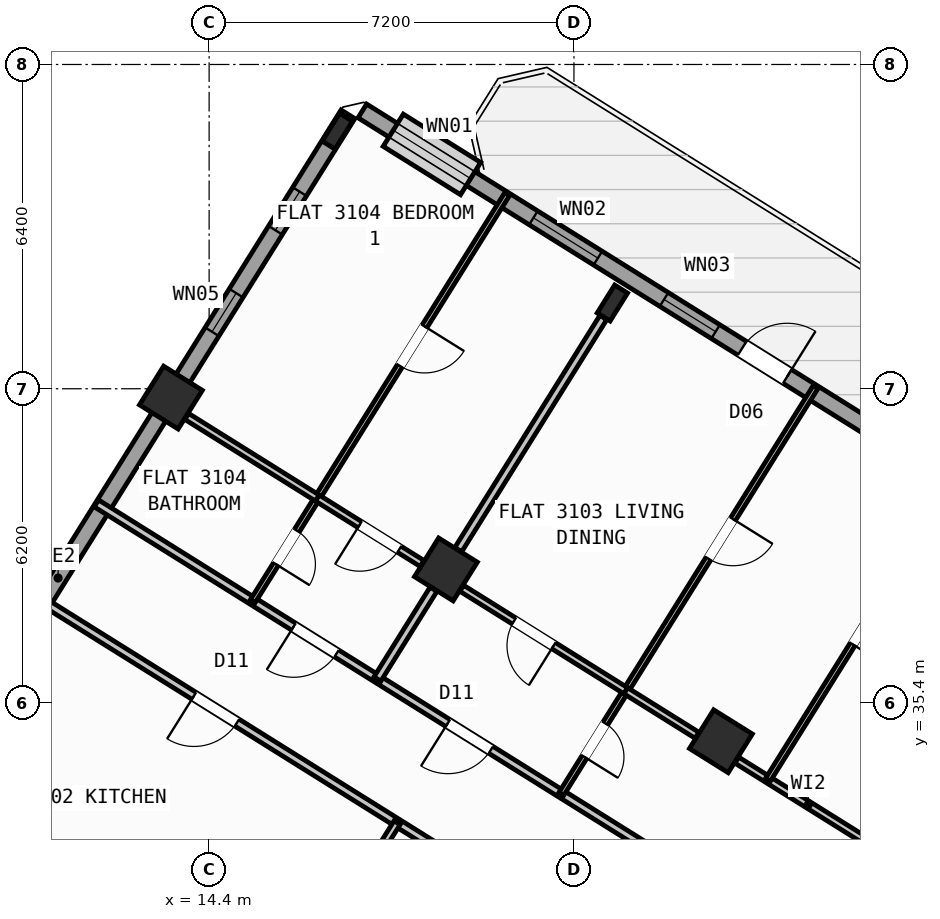
"""IFC4 building model, lengths in metres.
Left out: names, types, materials, properties, quantities, classifications, styles, units other than length and angle.
Written with IfcOpenShell. Run it as: python <this file> out.ifc"""

import sys

from ifc_helpers import new_model, si_unit, direction, frame, frame_2d, origin, origin_2d, place, context, subcontext, project, spatial, rectangle, hollow_rectangle, i_section, extrude, source, transform, mapped, element, fill, save


model = new_model("IFC4")
c1 = context("Model", 3, precision=1e-05, world=origin(), true_north=direction((0.0, 1.0)))
c2 = subcontext(c1, "Body", "Model", "MODEL_VIEW")
j1 = project(units=[si_unit("LENGTHUNIT", "METRE"), si_unit("PLANEANGLEUNIT", "RADIAN")], contexts=[c1])
p1 = place(None, origin())
s1 = spatial("IfcSite", under=j1, at=p1, CompositionType="ELEMENT")
p2 = place(p1, origin())
s2 = spatial("IfcBuilding", under=s1, at=p2, CompositionType="ELEMENT")
p3 = place(p2, frame((0.0, 0.0, 123.3)))
s3 = spatial("IfcBuildingStorey", under=s2, at=p3, CompositionType="ELEMENT", Elevation=123.3)
m1 = source(origin(), c2, "Body", "SweptSolid", [
    extrude(hollow_rectangle(XDim=0.9, YDim=0.9, WallThickness=0.036, at=origin_2d()), origin(), (0.0, 0.0, 1.0), 4.5),
])
p4 = place(p3, frame((24.5, 34.643, 0.0), z_axis=(0.0, 0.0, 1.0), x_axis=(-0.848048096156, 0.529919264233, 0.0)))
e1 = element("IfcColumn", 1, at=p4, inside=s3, PredefinedType="COLUMN", context=c2, shape_type="MappedRepresentation", body=[
    mapped(m1, transform((0.0, 0.0, 0.0), scale=1.0)),
])
m2 = source(origin(), c2, "Body", "SweptSolid", [
    extrude(i_section(OverallWidth=0.3, OverallDepth=0.65, WebThickness=0.016, FlangeThickness=0.031, at=origin_2d()), origin(), (0.0, 0.0, 1.0), 4.5),
])
p5 = place(p3, frame((22.358, 43.292, 0.0), z_axis=(0.0, 0.0, 1.0), x_axis=(-0.848048096156, 0.529919264233, 0.0)))
e2 = element("IfcColumn", 2, at=p5, inside=s3, PredefinedType="COLUMN", context=c2, shape_type="MappedRepresentation", body=[
    mapped(m2, transform((0.0, 0.0, 0.0), scale=1.0)),
])
p6 = place(p3, frame((19.073, 38.034, 0.0), z_axis=(0.0, 0.0, 1.0), x_axis=(-0.848048096156, 0.529919264233, 0.0)))
e3 = element("IfcColumn", 3, at=p6, inside=s3, PredefinedType="COLUMN", context=c2, shape_type="MappedRepresentation", body=[
    mapped(m1, transform((0.0, 0.0, 0.0), scale=1.0)),
])
p7 = place(p3, frame((16.931, 46.684, 0.0), z_axis=(0.0, 0.0, 1.0), x_axis=(-0.848048096156, 0.529919264233, 0.0)))
e4 = element("IfcColumn", 4, at=p7, inside=s3, PredefinedType="COLUMN", context=c2, shape_type="MappedRepresentation", body=[
    mapped(m2, transform((0.0, 0.0, 0.0), scale=1.0)),
])
p8 = place(p3, frame((13.646, 41.426, 0.0), z_axis=(0.0, 0.0, 1.0), x_axis=(-0.848048096156, 0.529919264233, 0.0)))
e5 = element("IfcColumn", 5, at=p8, inside=s3, PredefinedType="COLUMN", context=c2, shape_type="MappedRepresentation", body=[
    mapped(m1, transform((0.0, 0.0, 0.0), scale=1.0)),
])
p9 = place(p3, frame((5.7, 28.71, 0.0), z_axis=(0.0, 0.0, 1.0), x_axis=(0.529923711467, 0.8480453172, 0.0)))
e6 = element("IfcWall", 6, at=p9, inside=s3, PredefinedType="STANDARD", context=c2, shape_type="SweptSolid", body=[
    extrude(rectangle(XDim=21.587, YDim=0.32, at=frame_2d((10.794, 0.0))), origin(), (0.0, 0.0, 1.0), 2.395),
])
p10 = place(p9, frame((2.719, 0.0, 1.0)))
e7 = element("IfcOpeningElement", 7, at=p10, cuts=e6, PredefinedType="OPENING", context=c2, shape_type="SweptSolid", body=[
    extrude(rectangle(XDim=0.9, YDim=1.25, at=frame_2d((0.45, 0.625))), frame((0.0, 0.17, 0.0), z_axis=(0.0, -1.0, 0.0), x_axis=(1.0, 0.0, 0.0)), (0.0, 0.0, 1.0), 0.34),
])
p11 = place(p9, frame((16.525, 0.0, 1.0)))
e8 = element("IfcOpeningElement", 8, at=p11, cuts=e6, PredefinedType="OPENING", context=c2, shape_type="SweptSolid", body=[
    extrude(rectangle(XDim=0.9, YDim=1.25, at=frame_2d((0.45, 0.625))), frame((0.0, 0.17, 0.0), z_axis=(0.0, -1.0, 0.0), x_axis=(1.0, 0.0, 0.0)), (0.0, 0.0, 1.0), 0.34),
])
p12 = place(p9, frame((18.887, 0.0, 1.0)))
e9 = element("IfcOpeningElement", 9, at=p12, cuts=e6, PredefinedType="OPENING", context=c2, shape_type="SweptSolid", body=[
    extrude(rectangle(XDim=0.9, YDim=1.25, at=frame_2d((0.45, 0.625))), frame((0.0, 0.17, 0.0), z_axis=(0.0, -1.0, 0.0), x_axis=(1.0, 0.0, 0.0)), (0.0, 0.0, 1.0), 0.34),
])
p13 = place(p3, frame((17.424, 47.083, 0.0), z_axis=(0.0, 0.0, 1.0), x_axis=(0.848049927979, -0.529916332693, 0.0)))
e10 = element("IfcWall", 10, at=p13, inside=s3, PredefinedType="STANDARD", context=c2, shape_type="SweptSolid", body=[
    extrude(rectangle(XDim=29.223, YDim=0.32, at=frame_2d((14.612, 0.0))), origin(), (0.0, 0.0, 1.0), 4.22),
])
p14 = place(p13, frame((8.839, 0.0, 0.0)))
e11 = element("IfcOpeningElement", 11, at=p14, cuts=e10, PredefinedType="OPENING", context=c2, shape_type="SweptSolid", body=[
    extrude(rectangle(XDim=1.05, YDim=2.15, at=frame_2d((0.525, 1.075))), frame((0.0, 0.17, 0.0), z_axis=(0.0, -1.0, 0.0), x_axis=(1.0, 0.0, 0.0)), (0.0, 0.0, 1.0), 0.34),
])
p15 = place(p13, frame((0.719, 0.0, 0.85)))
e12 = element("IfcOpeningElement", 12, at=p15, cuts=e10, PredefinedType="OPENING", context=c2, shape_type="SweptSolid", body=[
    extrude(rectangle(XDim=1.8, YDim=1.5, at=frame_2d((0.9, 0.75))), frame((0.0, 0.17, 0.0), z_axis=(0.0, -1.0, 0.0), x_axis=(1.0, 0.0, 0.0)), (0.0, 0.0, 1.0), 0.34),
])
p16 = place(p13, frame((3.981, 0.0, 0.85)))
e13 = element("IfcOpeningElement", 13, at=p16, cuts=e10, PredefinedType="OPENING", context=c2, shape_type="SweptSolid", body=[
    extrude(rectangle(XDim=1.5, YDim=1.5, at=frame_2d((0.75, 0.75))), frame((0.0, 0.17, 0.0), z_axis=(0.0, -1.0, 0.0), x_axis=(1.0, 0.0, 0.0)), (0.0, 0.0, 1.0), 0.34),
])
p17 = place(p13, frame((7.021, 0.0, 0.95)))
e14 = element("IfcOpeningElement", 14, at=p17, cuts=e10, PredefinedType="OPENING", context=c2, shape_type="SweptSolid", body=[
    extrude(rectangle(XDim=1.2, YDim=1.4, at=frame_2d((0.6, 0.7))), frame((0.0, 0.17, 0.0), z_axis=(0.0, -1.0, 0.0), x_axis=(1.0, 0.0, 0.0)), (0.0, 0.0, 1.0), 0.34),
])
p18 = place(p13, frame((14.471, 0.0, 0.95)))
e15 = element("IfcOpeningElement", 15, at=p18, cuts=e10, PredefinedType="OPENING", context=c2, shape_type="SweptSolid", body=[
    extrude(rectangle(XDim=1.2, YDim=1.4, at=frame_2d((0.6, 0.7))), frame((0.0, 0.17, 0.0), z_axis=(0.0, -1.0, 0.0), x_axis=(1.0, 0.0, 0.0)), (0.0, 0.0, 1.0), 0.34),
])
p19 = place(p13, frame((17.254, 0.0, 1.0)))
e16 = element("IfcOpeningElement", 16, at=p19, cuts=e10, PredefinedType="OPENING", context=c2, shape_type="SweptSolid", body=[
    extrude(rectangle(XDim=0.9, YDim=1.25, at=frame_2d((0.45, 0.625))), frame((0.0, 0.17, 0.0), z_axis=(0.0, -1.0, 0.0), x_axis=(1.0, 0.0, 0.0)), (0.0, 0.0, 1.0), 0.34),
])
p20 = place(p13, frame((20.764, 0.0, 0.8)))
e17 = element("IfcOpeningElement", 17, at=p20, cuts=e10, PredefinedType="OPENING", context=c2, shape_type="SweptSolid", body=[
    extrude(rectangle(XDim=2.1, YDim=1.55, at=frame_2d((1.05, 0.775))), frame((0.0, 0.17, 0.0), z_axis=(0.0, -1.0, 0.0), x_axis=(1.0, 0.0, 0.0)), (0.0, 0.0, 1.0), 0.34),
])
p21 = place(p13, frame((25.403, 0.0, 0.8)))
e18 = element("IfcOpeningElement", 18, at=p21, cuts=e10, PredefinedType="OPENING", context=c2, shape_type="SweptSolid", body=[
    extrude(rectangle(XDim=2.1, YDim=1.55, at=frame_2d((1.05, 0.775))), frame((0.0, 0.17, 0.0), z_axis=(0.0, -1.0, 0.0), x_axis=(1.0, 0.0, 0.0)), (0.0, 0.0, 1.0), 0.34),
])
p22 = place(p3, frame((31.239, 38.274, 0.0), z_axis=(0.0, 0.0, 1.0), x_axis=(-0.529920220799, -0.848047498427, 0.0)))
e19 = element("IfcWall", 19, at=p22, inside=s3, PredefinedType="PARTITIONING", context=c2, shape_type="SweptSolid", body=[
    extrude(rectangle(XDim=9.2, YDim=0.16, at=frame_2d((4.6, 0.0))), origin(), (0.0, 0.0, 1.0), 4.21),
])
p23 = place(p3, frame((26.363, 30.472, 0.0), z_axis=(0.0, 0.0, 1.0), x_axis=(-0.848052408131, 0.529912363569, 0.0)))
e20 = element("IfcWall", 20, at=p23, inside=s3, PredefinedType="PARTITIONING", context=c2, shape_type="SweptSolid", body=[
    extrude(rectangle(XDim=16.73, YDim=0.16, at=frame_2d((8.365, 0.0))), origin(), (0.0, 0.0, 1.0), 4.21),
])
p24 = place(p23, frame((7.55, 0.0, 0.0)))
e21 = element("IfcOpeningElement", 21, at=p24, cuts=e20, PredefinedType="OPENING", context=c2, shape_type="SweptSolid", body=[
    extrude(rectangle(XDim=1.0, YDim=2.1, at=frame_2d((0.5, 1.05))), frame((0.0, 0.09, 0.0), z_axis=(0.0, -1.0, 0.0), x_axis=(1.0, 0.0, 0.0)), (0.0, 0.0, 1.0), 0.18),
])
p25 = place(p23, frame((11.14, 0.0, 0.0)))
e22 = element("IfcOpeningElement", 22, at=p25, cuts=e20, PredefinedType="OPENING", context=c2, shape_type="SweptSolid", body=[
    extrude(rectangle(XDim=1.0, YDim=2.1, at=frame_2d((0.5, 1.05))), frame((0.0, 0.09, 0.0), z_axis=(0.0, -1.0, 0.0), x_axis=(1.0, 0.0, 0.0)), (0.0, 0.0, 1.0), 0.18),
])
p26 = place(p3, frame((25.198, 28.606, 0.0), z_axis=(0.0, 0.0, 1.0), x_axis=(-0.848052408131, 0.529912363569, 0.0)))
e23 = element("IfcWall", 23, at=p26, inside=s3, PredefinedType="PARTITIONING", context=c2, shape_type="SweptSolid", body=[
    extrude(rectangle(XDim=16.73, YDim=0.16, at=frame_2d((8.365, 0.0))), origin(), (0.0, 0.0, 1.0), 4.21),
])
p27 = place(p26, frame((2.22, 0.0, 0.0)))
e24 = element("IfcOpeningElement", 24, at=p27, cuts=e23, PredefinedType="OPENING", context=c2, shape_type="SweptSolid", body=[
    extrude(rectangle(XDim=0.86, YDim=2.05, at=frame_2d((0.43, 1.025))), frame((0.0, 0.09, 0.0), z_axis=(0.0, -1.0, 0.0), x_axis=(1.0, 0.0, 0.0)), (0.0, 0.0, 1.0), 0.18),
])
p28 = place(p26, frame((12.084, 0.0, 0.0)))
e25 = element("IfcOpeningElement", 25, at=p28, cuts=e23, PredefinedType="OPENING", context=c2, shape_type="SweptSolid", body=[
    extrude(rectangle(XDim=1.0, YDim=2.1, at=frame_2d((0.5, 1.05))), frame((0.0, 0.09, 0.0), z_axis=(0.0, -1.0, 0.0), x_axis=(1.0, 0.0, 0.0)), (0.0, 0.0, 1.0), 0.18),
])
p29 = place(p3, frame((19.556, 26.73, 0.0), z_axis=(0.0, 0.0, 1.0), x_axis=(-0.848043949058, 0.52992590092, 0.0)))
e26 = element("IfcWall", 26, at=p29, inside=s3, PredefinedType="PLUMBINGWALL", context=c2, shape_type="SweptSolid", body=[
    extrude(rectangle(XDim=12.92, YDim=0.14, at=frame_2d((6.46, 0.0))), origin(), (0.0, 0.0, 1.0), 4.21),
])
p30 = place(p29, frame((5.849, 0.0, 0.0)))
e27 = element("IfcOpeningElement", 27, at=p30, cuts=e26, PredefinedType="OPENING", context=c2, shape_type="SweptSolid", body=[
    extrude(rectangle(XDim=0.92, YDim=2.08, at=frame_2d((0.46, 1.04))), frame((0.0, 0.08, 0.0), z_axis=(0.0, -1.0, 0.0), x_axis=(1.0, 0.0, 0.0)), (0.0, 0.0, 1.0), 0.16),
])
p31 = place(p3, frame((18.109, 33.035, 0.0), z_axis=(0.0, 0.0, 1.0), x_axis=(-0.529893526057, -0.848064178611, 0.0)))
e28 = element("IfcWall", 28, at=p31, inside=s3, PredefinedType="PLUMBINGWALL", context=c2, shape_type="SweptSolid", body=[
    extrude(rectangle(XDim=4.58, YDim=0.14, at=frame_2d((2.29, 0.0))), origin(), (0.0, 0.0, 1.0), 4.21),
])
p32 = place(p31, frame((1.9, 0.0, 0.0)))
e29 = element("IfcOpeningElement", 29, at=p32, cuts=e28, PredefinedType="OPENING", context=c2, shape_type="SweptSolid", body=[
    extrude(rectangle(XDim=0.78, YDim=2.05, at=frame_2d((0.39, 1.025))), frame((0.0, 0.08, 0.0), z_axis=(0.0, -1.0, 0.0), x_axis=(1.0, 0.0, 0.0)), (0.0, 0.0, 1.0), 0.16),
])
p33 = place(p3, frame((22.18, 43.006, 0.0), z_axis=(0.0, 0.0, 1.0), x_axis=(-0.529913610495, -0.848051628978, 0.0)))
e30 = element("IfcWall", 30, at=p33, inside=s3, PredefinedType="PARTITIONING", context=c2, shape_type="SweptSolid", body=[
    extrude(rectangle(XDim=5.401, YDim=0.16, at=frame_2d((2.7, 0.0))), origin(), (0.0, 0.0, 1.0), 4.21),
])
p34 = place(p3, frame((18.828, 37.643, 0.0), z_axis=(0.0, 0.0, 1.0), x_axis=(-0.529904345651, -0.848057418139, 0.0)))
e31 = element("IfcWall", 31, at=p34, inside=s3, PredefinedType="PARTITIONING", context=c2, shape_type="SweptSolid", body=[
    extrude(rectangle(XDim=2.088, YDim=0.16, at=frame_2d((1.044, 0.0))), origin(), (0.0, 0.0, 1.0), 2.395),
])
p35 = place(p3, frame((26.37, 41.635, 0.0), z_axis=(0.0, 0.0, 1.0), x_axis=(-0.529917830441, -0.848048992088, 0.0)))
e32 = element("IfcWall", 32, at=p35, inside=s3, PredefinedType="PARTITIONING", context=c2, shape_type="SweptSolid", body=[
    extrude(rectangle(XDim=9.47, YDim=0.11, at=frame_2d((4.735, 0.0))), origin(), (0.0, 0.0, 1.0), 3.865),
])
p36 = place(p35, frame((7.83, 0.0, 0.0)))
e33 = element("IfcOpeningElement", 33, at=p36, cuts=e32, PredefinedType="OPENING", context=c2, shape_type="SweptSolid", body=[
    extrude(rectangle(XDim=0.78, YDim=2.05, at=frame_2d((0.39, 1.025))), frame((0.0, 0.065, 0.0), z_axis=(0.0, -1.0, 0.0), x_axis=(1.0, 0.0, 0.0)), (0.0, 0.0, 1.0), 0.13),
])
p37 = place(p35, frame((3.075, 0.0, 0.0)))
e34 = element("IfcOpeningElement", 34, at=p37, cuts=e32, PredefinedType="OPENING", context=c2, shape_type="SweptSolid", body=[
    extrude(rectangle(XDim=0.92, YDim=2.08, at=frame_2d((0.46, 1.04))), frame((0.0, 0.065, 0.0), z_axis=(0.0, -1.0, 0.0), x_axis=(1.0, 0.0, 0.0)), (0.0, 0.0, 1.0), 0.13),
])
p38 = place(p3, frame((22.623, 35.639, 0.0), z_axis=(0.0, 0.0, 1.0), x_axis=(-0.8480485946, 0.529918466555, 0.0)))
e35 = element("IfcWall", 35, at=p38, inside=s3, PredefinedType="PLUMBINGWALL", context=c2, shape_type="SweptSolid", body=[
    extrude(rectangle(XDim=3.818, YDim=0.14, at=frame_2d((1.909, 0.0))), origin(), (0.0, 0.0, 1.0), 2.395),
])
p39 = place(p38, frame((1.68, 0.0, 0.0)))
e36 = element("IfcOpeningElement", 36, at=p39, cuts=e35, PredefinedType="OPENING", context=c2, shape_type="SweptSolid", body=[
    extrude(rectangle(XDim=0.92, YDim=2.08, at=frame_2d((0.46, 1.04))), frame((0.0, 0.08, 0.0), z_axis=(0.0, -1.0, 0.0), x_axis=(1.0, 0.0, 0.0)), (0.0, 0.0, 1.0), 0.16),
])
p40 = place(p3, frame((27.635, 32.507, 0.0), z_axis=(0.0, 0.0, 1.0), x_axis=(-0.848064240775, 0.529893426567, 0.0)))
e37 = element("IfcWall", 37, at=p40, inside=s3, PredefinedType="PLUMBINGWALL", context=c2, shape_type="SweptSolid", body=[
    extrude(rectangle(XDim=3.328, YDim=0.14, at=frame_2d((1.664, 0.0))), origin(), (0.0, 0.0, 1.0), 2.395),
])
p41 = place(p3, frame((24.029, 34.76, 0.0), z_axis=(0.0, 0.0, 1.0), x_axis=(-0.848023120795, 0.529959231071, 0.0)))
e38 = element("IfcWall", 38, at=p41, inside=s3, PredefinedType="PLUMBINGWALL", context=c2, shape_type="SweptSolid", body=[
    extrude(rectangle(XDim=1.658, YDim=0.14, at=frame_2d((0.829, 0.0))), origin(), (0.0, 0.0, 1.0), 2.395),
])
p42 = place(p3, frame((29.177, 39.881, 0.0), z_axis=(0.0, 0.0, 1.0), x_axis=(-0.529930649952, -0.848040981463, 0.0)))
e39 = element("IfcWall", 39, at=p42, inside=s3, PredefinedType="PARTITIONING", context=c2, shape_type="SweptSolid", body=[
    extrude(rectangle(XDim=7.07, YDim=0.11, at=frame_2d((3.535, 0.0))), origin(), (0.0, 0.0, 1.0), 4.21),
])
p43 = place(p42, frame((3.0, 0.0, 0.0)))
e40 = element("IfcOpeningElement", 40, at=p43, cuts=e39, PredefinedType="OPENING", context=c2, shape_type="SweptSolid", body=[
    extrude(rectangle(XDim=0.92, YDim=2.08, at=frame_2d((0.46, 1.04))), frame((0.0, 0.065, 0.0), z_axis=(0.0, -1.0, 0.0), x_axis=(1.0, 0.0, 0.0)), (0.0, 0.0, 1.0), 0.13),
])
p44 = place(p3, frame((20.281, 45.44, 0.0), z_axis=(0.0, 0.0, 1.0), x_axis=(-0.529917830441, -0.848048992088, 0.0)))
e41 = element("IfcWall", 41, at=p44, inside=s3, PredefinedType="PARTITIONING", context=c2, shape_type="SweptSolid", body=[
    extrude(rectangle(XDim=9.47, YDim=0.11, at=frame_2d((4.735, 0.0))), origin(), (0.0, 0.0, 1.0), 4.21),
])
p45 = place(p44, frame((7.83, 0.0, 0.0)))
e42 = element("IfcOpeningElement", 42, at=p45, cuts=e41, PredefinedType="OPENING", context=c2, shape_type="SweptSolid", body=[
    extrude(rectangle(XDim=0.78, YDim=2.05, at=frame_2d((0.39, 1.025))), frame((0.0, 0.065, 0.0), z_axis=(0.0, -1.0, 0.0), x_axis=(1.0, 0.0, 0.0)), (0.0, 0.0, 1.0), 0.13),
])
p46 = place(p44, frame((3.075, 0.0, 0.0)))
e43 = element("IfcOpeningElement", 43, at=p46, cuts=e41, PredefinedType="OPENING", context=c2, shape_type="SweptSolid", body=[
    extrude(rectangle(XDim=0.92, YDim=2.08, at=frame_2d((0.46, 1.04))), frame((0.0, 0.065, 0.0), z_axis=(0.0, -1.0, 0.0), x_axis=(1.0, 0.0, 0.0)), (0.0, 0.0, 1.0), 0.13),
])
p47 = place(p3, frame((18.602, 38.152, 0.0), z_axis=(0.0, 0.0, 1.0), x_axis=(-0.848020807548, 0.529962932634, 0.0)))
e44 = element("IfcWall", 44, at=p47, inside=s3, PredefinedType="PLUMBINGWALL", context=c2, shape_type="SweptSolid", body=[
    extrude(rectangle(XDim=2.438, YDim=0.14, at=frame_2d((1.219, 0.0))), origin(), (0.0, 0.0, 1.0), 2.395),
])
p48 = place(p47, frame((0.528, 0.0, 0.0)))
e45 = element("IfcOpeningElement", 45, at=p48, cuts=e44, PredefinedType="OPENING", context=c2, shape_type="SweptSolid", body=[
    extrude(rectangle(XDim=0.92, YDim=2.08, at=frame_2d((0.46, 1.04))), frame((0.0, 0.08, 0.0), z_axis=(0.0, -1.0, 0.0), x_axis=(1.0, 0.0, 0.0)), (0.0, 0.0, 1.0), 0.16),
])
p49 = place(p3, frame((16.534, 39.444, 0.0), z_axis=(0.0, 0.0, 1.0), x_axis=(-0.848056989933, 0.52990503095, 0.0)))
e46 = element("IfcWall", 46, at=p49, inside=s3, PredefinedType="PLUMBINGWALL", context=c2, shape_type="SweptSolid", body=[
    extrude(rectangle(XDim=3.038, YDim=0.14, at=frame_2d((1.519, 0.0))), origin(), (0.0, 0.0, 1.0), 2.395),
])
m3 = source(origin(), c2, "Body", "SweptSolid", [
    extrude(rectangle(XDim=1.05, YDim=2.15, at=frame_2d((0.525, 1.075))), frame((0.0, 0.025, 0.0), z_axis=(0.0, -1.0, 0.0), x_axis=(1.0, 0.0, 0.0)), (0.0, 0.0, 1.0), 0.05),
])
p50 = place(p14, origin())
e47 = element("IfcDoor", 47, at=p50, inside=s3, OperationType="SINGLE_SWING_RIGHT", PredefinedType="DOOR", context=c2, shape_type="MappedRepresentation", body=[
    mapped(m3, transform((0.0, 0.0, 0.0), scale=1.0)),
])
fill(e11, e47)
m4 = source(origin(), c2, "Body", "SweptSolid", [
    extrude(rectangle(XDim=0.9, YDim=1.25, at=frame_2d((0.45, 0.625))), frame((0.0, 0.03, 0.0), z_axis=(0.0, -1.0, 0.0), x_axis=(1.0, 0.0, 0.0)), (0.0, 0.0, 1.0), 0.06),
])
p51 = place(p11, origin())
e48 = element("IfcWindow", 48, at=p51, inside=s3, PartitioningType="SINGLE_PANEL", PredefinedType="WINDOW", context=c2, shape_type="MappedRepresentation", body=[
    mapped(m4, transform((0.0, 0.0, 0.0), scale=1.0)),
])
fill(e8, e48)
p52 = place(p12, origin())
e49 = element("IfcWindow", 49, at=p52, inside=s3, PartitioningType="SINGLE_PANEL", PredefinedType="WINDOW", context=c2, shape_type="MappedRepresentation", body=[
    mapped(m4, transform((0.0, 0.0, 0.0), scale=1.0)),
])
fill(e9, e49)
m5 = source(origin(), c2, "Body", "SweptSolid", [
    extrude(rectangle(XDim=1.8, YDim=1.5, at=frame_2d((0.9, 0.75))), frame((0.0, 0.03, 0.0), z_axis=(0.0, -1.0, 0.0), x_axis=(1.0, 0.0, 0.0)), (0.0, 0.0, 1.0), 0.06),
])
p53 = place(p15, origin())
e50 = element("IfcWindow", 50, at=p53, inside=s3, PartitioningType="SINGLE_PANEL", PredefinedType="WINDOW", context=c2, shape_type="MappedRepresentation", body=[
    mapped(m5, transform((0.0, 0.0, 0.0), scale=1.0)),
])
fill(e12, e50)
m6 = source(origin(), c2, "Body", "SweptSolid", [
    extrude(rectangle(XDim=1.5, YDim=1.5, at=frame_2d((0.75, 0.75))), frame((0.0, 0.03, 0.0), z_axis=(0.0, -1.0, 0.0), x_axis=(1.0, 0.0, 0.0)), (0.0, 0.0, 1.0), 0.06),
])
p54 = place(p16, origin())
e51 = element("IfcWindow", 51, at=p54, inside=s3, PartitioningType="SINGLE_PANEL", PredefinedType="WINDOW", context=c2, shape_type="MappedRepresentation", body=[
    mapped(m6, transform((0.0, 0.0, 0.0), scale=1.0)),
])
fill(e13, e51)
m7 = source(origin(), c2, "Body", "SweptSolid", [
    extrude(rectangle(XDim=1.2, YDim=1.4, at=frame_2d((0.6, 0.7))), frame((0.0, 0.03, 0.0), z_axis=(0.0, -1.0, 0.0), x_axis=(1.0, 0.0, 0.0)), (0.0, 0.0, 1.0), 0.06),
])
p55 = place(p17, origin())
e52 = element("IfcWindow", 52, at=p55, inside=s3, PartitioningType="SINGLE_PANEL", PredefinedType="WINDOW", context=c2, shape_type="MappedRepresentation", body=[
    mapped(m7, transform((0.0, 0.0, 0.0), scale=1.0)),
])
fill(e14, e52)
m8 = source(origin(), c2, "Body", "SweptSolid", [
    extrude(rectangle(XDim=1.0, YDim=2.1, at=frame_2d((0.5, 1.05))), frame((0.0, 0.025, 0.0), z_axis=(0.0, -1.0, 0.0), x_axis=(1.0, 0.0, 0.0)), (0.0, 0.0, 1.0), 0.05),
])
p56 = place(p28, origin())
e53 = element("IfcDoor", 53, at=p56, inside=s3, OperationType="SINGLE_SWING_RIGHT", PredefinedType="DOOR", context=c2, shape_type="MappedRepresentation", body=[
    mapped(m8, transform((0.0, 0.0, 0.0), scale=1.0)),
])
fill(e25, e53)
p57 = place(p24, origin())
e54 = element("IfcDoor", 54, at=p57, inside=s3, OperationType="SINGLE_SWING_RIGHT", PredefinedType="DOOR", context=c2, shape_type="MappedRepresentation", body=[
    mapped(m8, transform((0.0, 0.0, 0.0), scale=1.0)),
])
fill(e21, e54)
m9 = source(origin(), c2, "Body", "SweptSolid", [
    extrude(rectangle(XDim=0.92, YDim=2.08, at=frame_2d((0.46, 1.04))), frame((0.0, 0.025, 0.0), z_axis=(0.0, -1.0, 0.0), x_axis=(1.0, 0.0, 0.0)), (0.0, 0.0, 1.0), 0.05),
])
p58 = place(p39, origin())
e55 = element("IfcDoor", 55, at=p58, inside=s3, OperationType="SINGLE_SWING_LEFT", PredefinedType="DOOR", context=c2, shape_type="MappedRepresentation", body=[
    mapped(m9, transform((0.0, 0.0, 0.0), scale=1.0)),
])
fill(e36, e55)
m10 = source(origin(), c2, "Body", "SweptSolid", [
    extrude(rectangle(XDim=0.78, YDim=2.05, at=frame_2d((0.39, 1.025))), frame((0.0, 0.025, 0.0), z_axis=(0.0, -1.0, 0.0), x_axis=(1.0, 0.0, 0.0)), (0.0, 0.0, 1.0), 0.05),
])
p59 = place(p36, origin())
e56 = element("IfcDoor", 56, at=p59, inside=s3, OperationType="SINGLE_SWING_RIGHT", PredefinedType="DOOR", context=c2, shape_type="MappedRepresentation", body=[
    mapped(m10, transform((0.0, 0.0, 0.0), scale=1.0)),
])
fill(e33, e56)
p60 = place(p37, origin())
e57 = element("IfcDoor", 57, at=p60, inside=s3, OperationType="SINGLE_SWING_LEFT", PredefinedType="DOOR", context=c2, shape_type="MappedRepresentation", body=[
    mapped(m9, transform((0.0, 0.0, 0.0), scale=1.0)),
])
fill(e34, e57)
p61 = place(p43, origin())
e58 = element("IfcDoor", 58, at=p61, inside=s3, OperationType="SINGLE_SWING_RIGHT", PredefinedType="DOOR", context=c2, shape_type="MappedRepresentation", body=[
    mapped(m9, transform((0.0, 0.0, 0.0), scale=1.0)),
])
fill(e40, e58)
p62 = place(p25, origin())
e59 = element("IfcDoor", 59, at=p62, inside=s3, OperationType="SINGLE_SWING_RIGHT", PredefinedType="DOOR", context=c2, shape_type="MappedRepresentation", body=[
    mapped(m8, transform((0.0, 0.0, 0.0), scale=1.0)),
])
fill(e22, e59)
p63 = place(p48, origin())
e60 = element("IfcDoor", 60, at=p63, inside=s3, OperationType="SINGLE_SWING_RIGHT", PredefinedType="DOOR", context=c2, shape_type="MappedRepresentation", body=[
    mapped(m9, transform((0.0, 0.0, 0.0), scale=1.0)),
])
fill(e45, e60)
p64 = place(p45, origin())
e61 = element("IfcDoor", 61, at=p64, inside=s3, OperationType="SINGLE_SWING_RIGHT", PredefinedType="DOOR", context=c2, shape_type="MappedRepresentation", body=[
    mapped(m10, transform((0.0, 0.0, 0.0), scale=1.0)),
])
fill(e42, e61)
p65 = place(p46, origin())
e62 = element("IfcDoor", 62, at=p65, inside=s3, OperationType="SINGLE_SWING_LEFT", PredefinedType="DOOR", context=c2, shape_type="MappedRepresentation", body=[
    mapped(m9, transform((0.0, 0.0, 0.0), scale=1.0)),
])
fill(e43, e62)
save(model, sys.argv[1])
